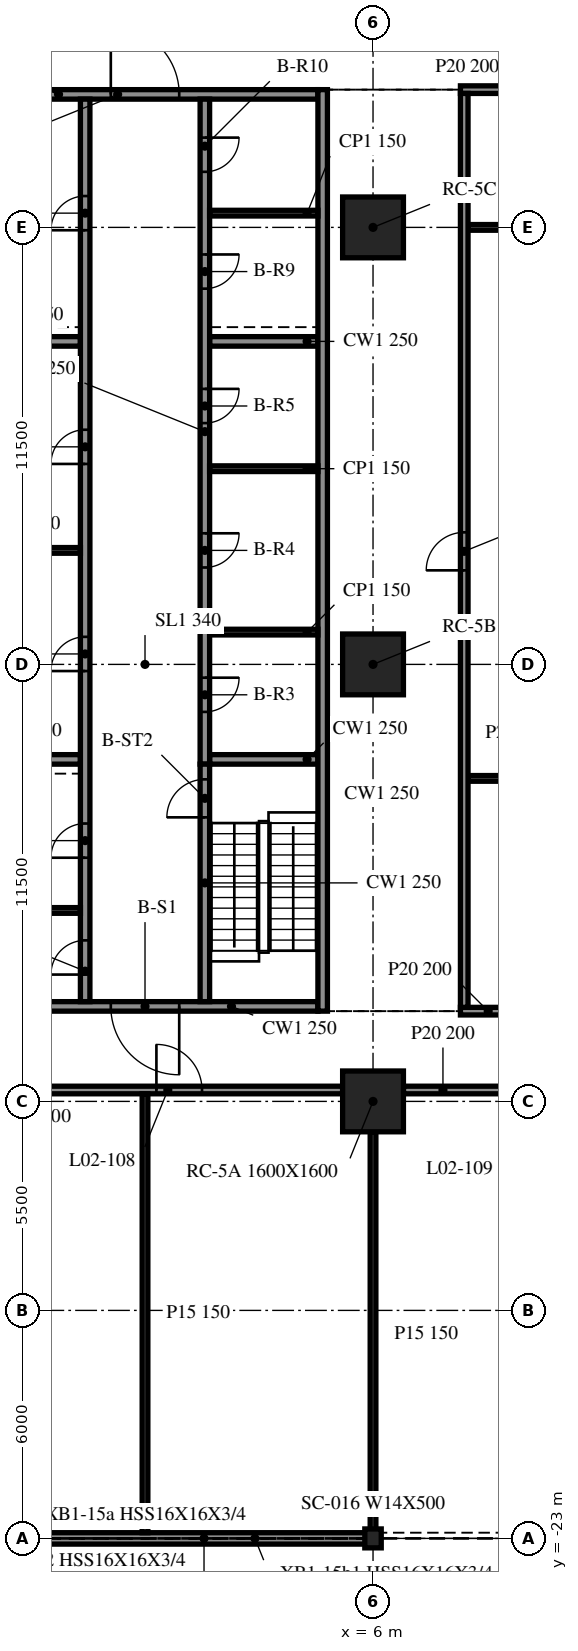
"""IFC4 building model, lengths in metres.
Left out: names, types, materials, properties, quantities, classifications, styles, units other than length and angle.
Written with IfcOpenShell. Run it as: python <this file> out.ifc"""

import sys

from ifc_helpers import new_model, si_unit, direction, frame, frame_2d, origin, origin_2d, place, context, subcontext, project, spatial, rectangle, i_section, extrude, element, fill, save


model = new_model("IFC4")
c1 = context("Model", 3, precision=1e-05, world=origin(), true_north=direction((0.0, 1.0)))
c2 = subcontext(c1, "Body", "Model", "MODEL_VIEW")
j1 = project(units=[si_unit("LENGTHUNIT", "METRE"), si_unit("PLANEANGLEUNIT", "RADIAN")], contexts=[c1])
p1 = place(None, origin())
s1 = spatial("IfcSite", under=j1, at=p1, CompositionType="ELEMENT")
p2 = place(p1, origin())
s2 = spatial("IfcBuilding", under=s1, at=p2, CompositionType="ELEMENT")
p3 = place(p2, frame((0.0, 0.0, 11.5)))
s3 = spatial("IfcBuildingStorey", under=s2, at=p3, CompositionType="ELEMENT", Elevation=11.5)
for number, where, z_axis, x_axis in (
    (1, (6.0, -11.5, -0.34), (0.0, 0.0, 1.0), (1.0, 0.0, 0.0)),
    (2, (6.0, 0.0, -0.34), (0.0, 0.0, 1.0), (1.0, 0.0, 0.0)),
    (3, (6.0, 11.5, -0.34), (0.0, 0.0, 1.0), (1.0, 0.0, 0.0)),
):
    element("IfcColumn", number, at=place(p3, frame(where, z_axis=z_axis, x_axis=x_axis)), inside=s3, PredefinedType="COLUMN", context=c2, shape_type="SweptSolid", body=[
        extrude(rectangle(XDim=1.6, YDim=1.6, at=origin_2d()), origin(), (0.0, 0.0, 1.0), 4.3),
    ])
p4 = place(p3, frame((6.0, -23.0, -0.34), z_axis=(0.0, 0.0, 1.0), x_axis=(1.0, 0.0, 0.0)))
e4 = element("IfcColumn", 4, at=p4, inside=s3, PredefinedType="COLUMN", context=c2, shape_type="SweptSolid", body=[
    extrude(i_section(OverallWidth=0.432, OverallDepth=0.498, WebThickness=0.056, FlangeThickness=0.089, at=origin_2d()), origin(), (0.0, 0.0, 1.0), 4.3),
])
p5 = place(p3, frame((-5.972, -23.0, 0.0), z_axis=(0.0, 0.0, 1.0), x_axis=(1.0, 0.0, 0.0)))
e5 = element("IfcWall", 5, at=p5, inside=s3, PredefinedType="NOTDEFINED", context=c2, shape_type="SweptSolid", body=[
    extrude(rectangle(XDim=11.944, YDim=0.3, at=frame_2d((5.972, 0.0))), origin(), (0.0, 0.0, 1.0), 3.203),
])
p6 = place(p3, frame((4.675, -9.125, 0.0), z_axis=(0.0, 0.0, 1.0), x_axis=(0.0, 1.0, 0.0)))
e6 = element("IfcWall", 6, at=p6, inside=s3, PredefinedType="SOLIDWALL", context=c2, shape_type="SweptSolid", body=[
    extrude(rectangle(XDim=24.25, YDim=0.25, at=frame_2d((12.125, 0.0))), origin(), (0.0, 0.0, 1.0), 3.96),
])
p7 = place(p3, frame((4.55, -9.0, 0.0), z_axis=(0.0, 0.0, 1.0), x_axis=(-1.0, 0.0, 0.0)))
e7 = element("IfcWall", 7, at=p7, inside=s3, PredefinedType="SOLIDWALL", context=c2, shape_type="SweptSolid", body=[
    extrude(rectangle(XDim=9.1, YDim=0.25, at=frame_2d((4.55, 0.0))), origin(), (0.0, 0.0, 1.0), 3.96),
])
p8 = place(p7, frame((3.65, 0.0, 0.0)))
e8 = element("IfcOpeningElement", 8, at=p8, cuts=e7, PredefinedType="OPENING", context=c2, shape_type="SweptSolid", body=[
    extrude(rectangle(XDim=1.8, YDim=2.1, at=frame_2d((0.9, 1.05))), frame((0.0, 0.135, 0.0), z_axis=(0.0, -1.0, 0.0), x_axis=(1.0, 0.0, 0.0)), (0.0, 0.0, 1.0), 0.27),
])
p9 = place(p3, frame((-4.55, 15.0, 0.0), z_axis=(0.0, 0.0, 1.0), x_axis=(1.0, 0.0, 0.0)))
e9 = element("IfcWall", 9, at=p9, inside=s3, PredefinedType="SOLIDWALL", context=c2, shape_type="SweptSolid", body=[
    extrude(rectangle(XDim=9.1, YDim=0.25, at=frame_2d((4.55, 0.0))), origin(), (0.0, 0.0, 1.0), 3.96),
])
p10 = place(p9, frame((3.65, 0.0, 0.0)))
e10 = element("IfcOpeningElement", 10, at=p10, cuts=e9, PredefinedType="OPENING", context=c2, shape_type="SweptSolid", body=[
    extrude(rectangle(XDim=1.8, YDim=2.1, at=frame_2d((0.9, 1.05))), frame((0.0, 0.135, 0.0), z_axis=(0.0, -1.0, 0.0), x_axis=(1.0, 0.0, 0.0)), (0.0, 0.0, 1.0), 0.27),
])
p11 = place(p3, frame((-1.575, -8.875, 0.0), z_axis=(0.0, 0.0, 1.0), x_axis=(0.0, 1.0, 0.0)))
e11 = element("IfcWall", 11, at=p11, inside=s3, PredefinedType="SOLIDWALL", context=c2, shape_type="SweptSolid", body=[
    extrude(rectangle(XDim=23.75, YDim=0.25, at=frame_2d((11.875, 0.0))), origin(), (0.0, 0.0, 1.0), 3.96),
])
p12 = place(p11, frame((8.7, 0.0, 0.0)))
e12 = element("IfcOpeningElement", 12, at=p12, cuts=e11, PredefinedType="OPENING", context=c2, shape_type="SweptSolid", body=[
    extrude(rectangle(XDim=0.9, YDim=2.1, at=frame_2d((0.45, 1.05))), frame((0.0, 0.135, 0.0), z_axis=(0.0, -1.0, 0.0), x_axis=(1.0, 0.0, 0.0)), (0.0, 0.0, 1.0), 0.27),
])
p13 = place(p11, frame((14.15, 0.0, 0.0)))
e13 = element("IfcOpeningElement", 13, at=p13, cuts=e11, PredefinedType="OPENING", context=c2, shape_type="SweptSolid", body=[
    extrude(rectangle(XDim=0.9, YDim=2.1, at=frame_2d((0.45, 1.05))), frame((0.0, 0.135, 0.0), z_axis=(0.0, -1.0, 0.0), x_axis=(1.0, 0.0, 0.0)), (0.0, 0.0, 1.0), 0.27),
])
p14 = place(p11, frame((0.712, 0.0, 0.0)))
e14 = element("IfcOpeningElement", 14, at=p14, cuts=e11, PredefinedType="OPENING", context=c2, shape_type="SweptSolid", body=[
    extrude(rectangle(XDim=0.9, YDim=2.1, at=frame_2d((0.45, 1.05))), frame((0.0, 0.135, 0.0), z_axis=(0.0, -1.0, 0.0), x_axis=(1.0, 0.0, 0.0)), (0.0, 0.0, 1.0), 0.27),
])
p15 = place(p11, frame((3.788, 0.0, 0.0)))
e15 = element("IfcOpeningElement", 15, at=p15, cuts=e11, PredefinedType="OPENING", context=c2, shape_type="SweptSolid", body=[
    extrude(rectangle(XDim=0.9, YDim=2.1, at=frame_2d((0.45, 1.05))), frame((0.0, 0.135, 0.0), z_axis=(0.0, -1.0, 0.0), x_axis=(1.0, 0.0, 0.0)), (0.0, 0.0, 1.0), 0.27),
])
p16 = place(p11, frame((20.3, 0.0, 0.0)))
e16 = element("IfcOpeningElement", 16, at=p16, cuts=e11, PredefinedType="OPENING", context=c2, shape_type="SweptSolid", body=[
    extrude(rectangle(XDim=0.9, YDim=2.1, at=frame_2d((0.45, 1.05))), frame((0.0, 0.135, 0.0), z_axis=(0.0, -1.0, 0.0), x_axis=(1.0, 0.0, 0.0)), (0.0, 0.0, 1.0), 0.27),
])
p17 = place(p3, frame((1.575, -8.875, 0.0), z_axis=(0.0, 0.0, 1.0), x_axis=(0.0, 1.0, 0.0)))
e17 = element("IfcWall", 17, at=p17, inside=s3, PredefinedType="SOLIDWALL", context=c2, shape_type="SweptSolid", body=[
    extrude(rectangle(XDim=6.25, YDim=0.25, at=frame_2d((3.125, 0.0))), origin(), (0.0, 0.0, 1.0), 3.96),
])
p18 = place(p17, frame((4.85, 0.0, 0.0)))
e18 = element("IfcOpeningElement", 18, at=p18, cuts=e17, PredefinedType="OPENING", context=c2, shape_type="SweptSolid", body=[
    extrude(rectangle(XDim=1.0, YDim=2.1, at=frame_2d((0.5, 1.05))), frame((0.0, 0.135, 0.0), z_axis=(0.0, -1.0, 0.0), x_axis=(1.0, 0.0, 0.0)), (0.0, 0.0, 1.0), 0.27),
])
p19 = place(p3, frame((1.575, 14.875, 0.0), z_axis=(0.0, 0.0, 1.0), x_axis=(0.0, -1.0, 0.0)))
e19 = element("IfcWall", 19, at=p19, inside=s3, PredefinedType="SOLIDWALL", context=c2, shape_type="SweptSolid", body=[
    extrude(rectangle(XDim=17.5, YDim=0.25, at=frame_2d((8.75, 0.0))), origin(), (0.0, 0.0, 1.0), 3.96),
])
p20 = place(p19, frame((15.225, 0.0, 0.0)))
e20 = element("IfcOpeningElement", 20, at=p20, cuts=e19, PredefinedType="OPENING", context=c2, shape_type="SweptSolid", body=[
    extrude(rectangle(XDim=0.9, YDim=2.1, at=frame_2d((0.45, 1.05))), frame((0.0, 0.135, 0.0), z_axis=(0.0, -1.0, 0.0), x_axis=(1.0, 0.0, 0.0)), (0.0, 0.0, 1.0), 0.27),
])
p21 = place(p19, frame((11.425, 0.0, 0.0)))
e21 = element("IfcOpeningElement", 21, at=p21, cuts=e19, PredefinedType="OPENING", context=c2, shape_type="SweptSolid", body=[
    extrude(rectangle(XDim=0.9, YDim=2.1, at=frame_2d((0.45, 1.05))), frame((0.0, 0.135, 0.0), z_axis=(0.0, -1.0, 0.0), x_axis=(1.0, 0.0, 0.0)), (0.0, 0.0, 1.0), 0.27),
])
p22 = place(p19, frame((7.625, 0.0, 0.0)))
e22 = element("IfcOpeningElement", 22, at=p22, cuts=e19, PredefinedType="OPENING", context=c2, shape_type="SweptSolid", body=[
    extrude(rectangle(XDim=0.9, YDim=2.1, at=frame_2d((0.45, 1.05))), frame((0.0, 0.135, 0.0), z_axis=(0.0, -1.0, 0.0), x_axis=(1.0, 0.0, 0.0)), (0.0, 0.0, 1.0), 0.27),
])
p23 = place(p19, frame((4.087, 0.0, 0.0)))
e23 = element("IfcOpeningElement", 23, at=p23, cuts=e19, PredefinedType="OPENING", context=c2, shape_type="SweptSolid", body=[
    extrude(rectangle(XDim=0.9, YDim=2.1, at=frame_2d((0.45, 1.05))), frame((0.0, 0.135, 0.0), z_axis=(0.0, -1.0, 0.0), x_axis=(1.0, 0.0, 0.0)), (0.0, 0.0, 1.0), 0.27),
])
p24 = place(p19, frame((1.012, 0.0, 0.0)))
e24 = element("IfcOpeningElement", 24, at=p24, cuts=e19, PredefinedType="OPENING", context=c2, shape_type="SweptSolid", body=[
    extrude(rectangle(XDim=0.9, YDim=2.1, at=frame_2d((0.45, 1.05))), frame((0.0, 0.135, 0.0), z_axis=(0.0, -1.0, 0.0), x_axis=(1.0, 0.0, 0.0)), (0.0, 0.0, 1.0), 0.27),
])
for number, where, z_axis, x_axis in (
    (25, (-4.55, -2.5, 0.0), (0.0, 0.0, 1.0), (1.0, 0.0, 0.0)),
    (26, (-4.55, 8.5, 0.0), (0.0, 0.0, 1.0), (1.0, 0.0, 0.0)),
    (27, (1.7, -2.5, 0.0), (0.0, 0.0, 1.0), (1.0, 0.0, 0.0)),
    (28, (1.7, 8.5, 0.0), (0.0, 0.0, 1.0), (1.0, 0.0, 0.0)),
):
    element("IfcWall", number, at=place(p3, frame(where, z_axis=z_axis, x_axis=x_axis)), inside=s3, PredefinedType="SOLIDWALL", context=c2, shape_type="SweptSolid", body=[
        extrude(rectangle(XDim=2.85, YDim=0.25, at=frame_2d((1.425, 0.0))), origin(), (0.0, 0.0, 1.0), 3.96),
    ])
for number, where, z_axis, x_axis in (
    (29, (-4.55, 3.0, 0.0), (0.0, 0.0, 1.0), (1.0, 0.0, 0.0)),
    (30, (1.7, 0.85, 0.0), (0.0, 0.0, 1.0), (1.0, 0.0, 0.0)),
    (31, (1.7, 5.15, 0.0), (0.0, 0.0, 1.0), (1.0, 0.0, 0.0)),
    (32, (-4.55, -6.475, 0.0), (0.0, 0.0, 1.0), (1.0, 0.0, 0.0)),
    (33, (1.7, 11.875, 0.0), (0.0, 0.0, 1.0), (1.0, 0.0, 0.0)),
):
    element("IfcWall", number, at=place(p3, frame(where, z_axis=z_axis, x_axis=x_axis)), inside=s3, PredefinedType="PARTITIONING", context=c2, shape_type="SweptSolid", body=[
        extrude(rectangle(XDim=2.85, YDim=0.15, at=frame_2d((1.425, 0.0))), origin(), (0.0, 0.0, 1.0), 3.96),
    ])
p25 = place(p3, frame((-5.2, -11.2, 0.0), z_axis=(0.0, 0.0, 1.0), x_axis=(1.0, 0.0, 0.0)))
e34 = element("IfcWall", 34, at=p25, inside=s3, PredefinedType="PARTITIONING", context=c2, shape_type="SweptSolid", body=[
    extrude(rectangle(XDim=10.4, YDim=0.2, at=frame_2d((5.2, 0.0))), origin(), (0.0, 0.0, 1.0), 3.96),
])
p26 = place(p25, frame((5.5, 0.0, 0.0)))
e35 = element("IfcOpeningElement", 35, at=p26, cuts=e34, PredefinedType="OPENING", context=c2, shape_type="SweptSolid", body=[
    extrude(rectangle(XDim=1.2, YDim=2.1, at=frame_2d((0.6, 1.05))), frame((0.0, 0.11, 0.0), z_axis=(0.0, -1.0, 0.0), x_axis=(1.0, 0.0, 0.0)), (0.0, 0.0, 1.0), 0.22),
])
p27 = place(p3, frame((6.8, -11.2, 0.0), z_axis=(0.0, 0.0, 1.0), x_axis=(1.0, 0.0, 0.0)))
e36 = element("IfcWall", 36, at=p27, inside=s3, PredefinedType="PARTITIONING", context=c2, shape_type="SweptSolid", body=[
    extrude(rectangle(XDim=10.4, YDim=0.2, at=frame_2d((5.2, 0.0))), origin(), (0.0, 0.0, 1.0), 3.96),
])
p28 = place(p27, frame((3.7, 0.0, 0.0)))
e37 = element("IfcOpeningElement", 37, at=p28, cuts=e36, PredefinedType="OPENING", context=c2, shape_type="SweptSolid", body=[
    extrude(rectangle(XDim=1.2, YDim=2.1, at=frame_2d((0.6, 1.05))), frame((0.0, 0.11, 0.0), z_axis=(0.0, -1.0, 0.0), x_axis=(1.0, 0.0, 0.0)), (0.0, 0.0, 1.0), 0.22),
])
p29 = place(p27, frame((5.5, 0.0, 0.0)))
e38 = element("IfcOpeningElement", 38, at=p29, cuts=e36, PredefinedType="OPENING", context=c2, shape_type="SweptSolid", body=[
    extrude(rectangle(XDim=1.2, YDim=2.1, at=frame_2d((0.6, 1.05))), frame((0.0, 0.11, 0.0), z_axis=(0.0, -1.0, 0.0), x_axis=(1.0, 0.0, 0.0)), (0.0, 0.0, 1.0), 0.22),
])
p30 = place(p27, frame((8.5, 0.0, 0.0)))
e39 = element("IfcOpeningElement", 39, at=p30, cuts=e36, PredefinedType="OPENING", context=c2, shape_type="SweptSolid", body=[
    extrude(rectangle(XDim=1.2, YDim=2.1, at=frame_2d((0.6, 1.05))), frame((0.0, 0.11, 0.0), z_axis=(0.0, -1.0, 0.0), x_axis=(1.0, 0.0, 0.0)), (0.0, 0.0, 1.0), 0.22),
])
p31 = place(p3, frame((8.3, -9.125, 0.0), z_axis=(0.0, 0.0, 1.0), x_axis=(1.0, 0.0, 0.0)))
e40 = element("IfcWall", 40, at=p31, inside=s3, PredefinedType="PARTITIONING", context=c2, shape_type="SweptSolid", body=[
    extrude(rectangle(XDim=7.3, YDim=0.2, at=frame_2d((3.65, 0.0))), origin(), (0.0, 0.0, 1.0), 3.96),
])
p32 = place(p31, frame((3.1, 0.0, 0.0)))
e41 = element("IfcOpeningElement", 41, at=p32, cuts=e40, PredefinedType="OPENING", context=c2, shape_type="SweptSolid", body=[
    extrude(rectangle(XDim=1.0, YDim=2.1, at=frame_2d((0.5, 1.05))), frame((0.0, 0.11, 0.0), z_axis=(0.0, -1.0, 0.0), x_axis=(1.0, 0.0, 0.0)), (0.0, 0.0, 1.0), 0.22),
])
for number, where, z_axis, x_axis in (
    (42, (8.5, -3.0, 0.0), (0.0, 0.0, 1.0), (1.0, 0.0, 0.0)),
    (43, (8.5, 11.5, 0.0), (0.0, 0.0, 1.0), (1.0, 0.0, 0.0)),
):
    element("IfcWall", number, at=place(p3, frame(where, z_axis=z_axis, x_axis=x_axis)), inside=s3, PredefinedType="PARTITIONING", context=c2, shape_type="SweptSolid", body=[
        extrude(rectangle(XDim=6.9, YDim=0.15, at=frame_2d((3.45, 0.0))), origin(), (0.0, 0.0, 1.0), 3.96),
    ])
p33 = place(p3, frame((8.3, 15.125, 0.0), z_axis=(0.0, 0.0, 1.0), x_axis=(1.0, 0.0, 0.0)))
e44 = element("IfcWall", 44, at=p33, inside=s3, PredefinedType="PARTITIONING", context=c2, shape_type="SweptSolid", body=[
    extrude(rectangle(XDim=7.3, YDim=0.2, at=frame_2d((3.65, 0.0))), origin(), (0.0, 0.0, 1.0), 3.96),
])
p34 = place(p33, frame((3.1, 0.0, 0.0)))
e45 = element("IfcOpeningElement", 45, at=p34, cuts=e44, PredefinedType="OPENING", context=c2, shape_type="SweptSolid", body=[
    extrude(rectangle(XDim=1.0, YDim=2.1, at=frame_2d((0.5, 1.05))), frame((0.0, 0.11, 0.0), z_axis=(0.0, -1.0, 0.0), x_axis=(1.0, 0.0, 0.0)), (0.0, 0.0, 1.0), 0.22),
])
p35 = place(p3, frame((0.0, -22.85, 0.0), z_axis=(0.0, 0.0, 1.0), x_axis=(0.0, 1.0, 0.0)))
e46 = element("IfcWall", 46, at=p35, inside=s3, PredefinedType="PARTITIONING", context=c2, shape_type="SweptSolid", body=[
    extrude(rectangle(XDim=11.55, YDim=0.15, at=frame_2d((5.775, 0.0))), origin(), (0.0, 0.0, 1.0), 3.96),
])
p36 = place(p3, frame((6.0, -22.975, 0.0), z_axis=(0.0, 0.0, 1.0), x_axis=(0.0, 1.0, 0.0)))
e47 = element("IfcWall", 47, at=p36, inside=s3, PredefinedType="PARTITIONING", context=c2, shape_type="SweptSolid", body=[
    extrude(rectangle(XDim=10.675, YDim=0.15, at=frame_2d((5.337, 0.0))), origin(), (0.0, 0.0, 1.0), 3.96),
])
p37 = place(p3, frame((8.4, -9.025, 0.0), z_axis=(0.0, 0.0, 1.0), x_axis=(0.0, 1.0, 0.0)))
e48 = element("IfcWall", 48, at=p37, inside=s3, PredefinedType="PARTITIONING", context=c2, shape_type="SweptSolid", body=[
    extrude(rectangle(XDim=24.05, YDim=0.2, at=frame_2d((12.025, 0.0))), origin(), (0.0, 0.0, 1.0), 3.96),
])
p38 = place(p37, frame((11.5, 0.0, 0.0)))
e49 = element("IfcOpeningElement", 49, at=p38, cuts=e48, PredefinedType="OPENING", context=c2, shape_type="SweptSolid", body=[
    extrude(rectangle(XDim=1.0, YDim=2.1, at=frame_2d((0.5, 1.05))), frame((0.0, 0.11, 0.0), z_axis=(0.0, -1.0, 0.0), x_axis=(1.0, 0.0, 0.0)), (0.0, 0.0, 1.0), 0.22),
])
p39 = place(p8, origin())
e50 = element("IfcDoor", 50, at=p39, inside=s3, OperationType="DOUBLE_DOOR_SINGLE_SWING", PredefinedType="DOOR", context=c2, shape_type="SweptSolid", body=[
    extrude(rectangle(XDim=1.8, YDim=2.1, at=frame_2d((0.9, 1.05))), frame((0.0, 0.025, 0.0), z_axis=(0.0, -1.0, 0.0), x_axis=(1.0, 0.0, 0.0)), (0.0, 0.0, 1.0), 0.05),
])
fill(e8, e50)
p40 = place(p10, origin())
e51 = element("IfcDoor", 51, at=p40, inside=s3, OperationType="DOUBLE_DOOR_SINGLE_SWING", PredefinedType="DOOR", context=c2, shape_type="SweptSolid", body=[
    extrude(rectangle(XDim=1.8, YDim=2.1, at=frame_2d((0.9, 1.05))), frame((0.0, 0.025, 0.0), z_axis=(0.0, -1.0, 0.0), x_axis=(1.0, 0.0, 0.0)), (0.0, 0.0, 1.0), 0.05),
])
fill(e10, e51)
p41 = place(p12, origin())
e52 = element("IfcDoor", 52, at=p41, inside=s3, OperationType="SINGLE_SWING_LEFT", PredefinedType="DOOR", context=c2, shape_type="SweptSolid", body=[
    extrude(rectangle(XDim=0.9, YDim=2.1, at=frame_2d((0.45, 1.05))), frame((0.0, 0.025, 0.0), z_axis=(0.0, -1.0, 0.0), x_axis=(1.0, 0.0, 0.0)), (0.0, 0.0, 1.0), 0.05),
])
fill(e12, e52)
p42 = place(p13, origin())
e53 = element("IfcDoor", 53, at=p42, inside=s3, OperationType="SINGLE_SWING_RIGHT", PredefinedType="DOOR", context=c2, shape_type="SweptSolid", body=[
    extrude(rectangle(XDim=0.9, YDim=2.1, at=frame_2d((0.45, 1.05))), frame((0.0, 0.025, 0.0), z_axis=(0.0, -1.0, 0.0), x_axis=(1.0, 0.0, 0.0)), (0.0, 0.0, 1.0), 0.05),
])
fill(e13, e53)
p43 = place(p20, origin())
e54 = element("IfcDoor", 54, at=p43, inside=s3, OperationType="SINGLE_SWING_LEFT", PredefinedType="DOOR", context=c2, shape_type="SweptSolid", body=[
    extrude(rectangle(XDim=0.9, YDim=2.1, at=frame_2d((0.45, 1.05))), frame((0.0, 0.025, 0.0), z_axis=(0.0, -1.0, 0.0), x_axis=(1.0, 0.0, 0.0)), (0.0, 0.0, 1.0), 0.05),
])
fill(e20, e54)
p44 = place(p21, origin())
e55 = element("IfcDoor", 55, at=p44, inside=s3, OperationType="SINGLE_SWING_RIGHT", PredefinedType="DOOR", context=c2, shape_type="SweptSolid", body=[
    extrude(rectangle(XDim=0.9, YDim=2.1, at=frame_2d((0.45, 1.05))), frame((0.0, 0.025, 0.0), z_axis=(0.0, -1.0, 0.0), x_axis=(1.0, 0.0, 0.0)), (0.0, 0.0, 1.0), 0.05),
])
fill(e21, e55)
p45 = place(p22, origin())
e56 = element("IfcDoor", 56, at=p45, inside=s3, OperationType="SINGLE_SWING_LEFT", PredefinedType="DOOR", context=c2, shape_type="SweptSolid", body=[
    extrude(rectangle(XDim=0.9, YDim=2.1, at=frame_2d((0.45, 1.05))), frame((0.0, 0.025, 0.0), z_axis=(0.0, -1.0, 0.0), x_axis=(1.0, 0.0, 0.0)), (0.0, 0.0, 1.0), 0.05),
])
fill(e22, e56)
p46 = place(p14, origin())
e57 = element("IfcDoor", 57, at=p46, inside=s3, OperationType="SINGLE_SWING_RIGHT", PredefinedType="DOOR", context=c2, shape_type="SweptSolid", body=[
    extrude(rectangle(XDim=0.9, YDim=2.1, at=frame_2d((0.45, 1.05))), frame((0.0, 0.025, 0.0), z_axis=(0.0, -1.0, 0.0), x_axis=(1.0, 0.0, 0.0)), (0.0, 0.0, 1.0), 0.05),
])
fill(e14, e57)
p47 = place(p15, origin())
e58 = element("IfcDoor", 58, at=p47, inside=s3, OperationType="SINGLE_SWING_LEFT", PredefinedType="DOOR", context=c2, shape_type="SweptSolid", body=[
    extrude(rectangle(XDim=0.9, YDim=2.1, at=frame_2d((0.45, 1.05))), frame((0.0, 0.025, 0.0), z_axis=(0.0, -1.0, 0.0), x_axis=(1.0, 0.0, 0.0)), (0.0, 0.0, 1.0), 0.05),
])
fill(e15, e58)
p48 = place(p16, origin())
e59 = element("IfcDoor", 59, at=p48, inside=s3, OperationType="SINGLE_SWING_RIGHT", PredefinedType="DOOR", context=c2, shape_type="SweptSolid", body=[
    extrude(rectangle(XDim=0.9, YDim=2.1, at=frame_2d((0.45, 1.05))), frame((0.0, 0.025, 0.0), z_axis=(0.0, -1.0, 0.0), x_axis=(1.0, 0.0, 0.0)), (0.0, 0.0, 1.0), 0.05),
])
fill(e16, e59)
p49 = place(p23, origin())
e60 = element("IfcDoor", 60, at=p49, inside=s3, OperationType="SINGLE_SWING_LEFT", PredefinedType="DOOR", context=c2, shape_type="SweptSolid", body=[
    extrude(rectangle(XDim=0.9, YDim=2.1, at=frame_2d((0.45, 1.05))), frame((0.0, 0.025, 0.0), z_axis=(0.0, -1.0, 0.0), x_axis=(1.0, 0.0, 0.0)), (0.0, 0.0, 1.0), 0.05),
])
fill(e23, e60)
p50 = place(p24, origin())
e61 = element("IfcDoor", 61, at=p50, inside=s3, OperationType="SINGLE_SWING_RIGHT", PredefinedType="DOOR", context=c2, shape_type="SweptSolid", body=[
    extrude(rectangle(XDim=0.9, YDim=2.1, at=frame_2d((0.45, 1.05))), frame((0.0, 0.025, 0.0), z_axis=(0.0, -1.0, 0.0), x_axis=(1.0, 0.0, 0.0)), (0.0, 0.0, 1.0), 0.05),
])
fill(e24, e61)
p51 = place(p18, origin())
e62 = element("IfcDoor", 62, at=p51, inside=s3, OperationType="SINGLE_SWING_LEFT", PredefinedType="DOOR", context=c2, shape_type="SweptSolid", body=[
    extrude(rectangle(XDim=1.0, YDim=2.1, at=frame_2d((0.5, 1.05))), frame((0.0, 0.025, 0.0), z_axis=(0.0, -1.0, 0.0), x_axis=(1.0, 0.0, 0.0)), (0.0, 0.0, 1.0), 0.05),
])
fill(e18, e62)
p52 = place(p26, origin())
e63 = element("IfcDoor", 63, at=p52, inside=s3, OperationType="SINGLE_SWING_LEFT", PredefinedType="DOOR", context=c2, shape_type="SweptSolid", body=[
    extrude(rectangle(XDim=1.2, YDim=2.1, at=frame_2d((0.6, 1.05))), frame((0.0, 0.025, 0.0), z_axis=(0.0, -1.0, 0.0), x_axis=(1.0, 0.0, 0.0)), (0.0, 0.0, 1.0), 0.05),
])
fill(e35, e63)
p53 = place(p38, origin())
e64 = element("IfcDoor", 64, at=p53, inside=s3, OperationType="SINGLE_SWING_RIGHT", PredefinedType="DOOR", context=c2, shape_type="SweptSolid", body=[
    extrude(rectangle(XDim=1.0, YDim=2.1, at=frame_2d((0.5, 1.05))), frame((0.0, 0.025, 0.0), z_axis=(0.0, -1.0, 0.0), x_axis=(1.0, 0.0, 0.0)), (0.0, 0.0, 1.0), 0.05),
])
fill(e49, e64)
save(model, sys.argv[1])
